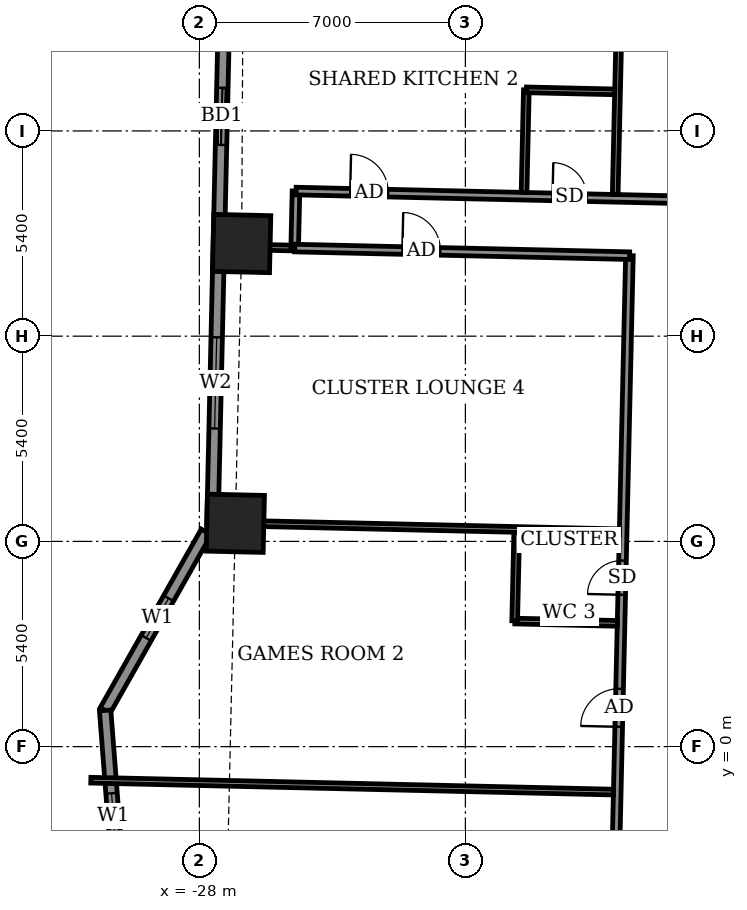
"""IFC4 building model, lengths in metres.
Left out: names, types, materials, properties, quantities, classifications, styles, units other than length and angle.
Written with IfcOpenShell. Run it as: python <this file> out.ifc"""

import sys

from ifc_helpers import new_model, si_unit, direction, frame, frame_2d, origin, origin_2d, place, context, subcontext, project, spatial, rectangle, extrude, element, fill, save


model = new_model("IFC4")
c1 = context("Model", 3, precision=1e-05, world=origin(), true_north=direction((0.0, 1.0)))
c2 = subcontext(c1, "Body", "Model", "MODEL_VIEW")
j1 = project(units=[si_unit("LENGTHUNIT", "METRE"), si_unit("PLANEANGLEUNIT", "RADIAN")], contexts=[c1])
p1 = place(None, origin())
s1 = spatial("IfcSite", under=j1, at=p1, CompositionType="ELEMENT")
p2 = place(p1, origin())
s2 = spatial("IfcBuilding", under=s1, at=p2, CompositionType="ELEMENT")
p3 = place(p2, frame((0.0, 0.0, 60.3)))
s3 = spatial("IfcBuildingStorey", under=s2, at=p3, CompositionType="ELEMENT", Elevation=60.3)
for number, where, z_axis, x_axis in (
    (1, (-26.887, 13.238, -0.55), (0.0, 0.0, 1.0), (-0.023, -1.0, 0.0)),
    (2, (-27.054, 5.877, -0.55), (0.0, 0.0, 1.0), (-0.023, -1.0, 0.0)),
):
    element("IfcColumn", number, at=place(p3, frame(where, z_axis=z_axis, x_axis=x_axis)), inside=s3, PredefinedType="COLUMN", context=c2, shape_type="SweptSolid", body=[
        extrude(rectangle(XDim=1.5, YDim=1.5, at=origin_2d()), origin(), (0.0, 0.0, 1.0), 3.6),
    ])
p4 = place(p3, frame((-27.324, 20.462, 0.0), z_axis=(0.0, 0.0, 1.0), x_axis=(-0.022695628174, -0.999742421057, 0.0)))
e3 = element("IfcWall", 3, at=p4, inside=s3, PredefinedType="SOLIDWALL", context=c2, shape_type="SweptSolid", body=[
    extrude(rectangle(XDim=14.63, YDim=0.3, at=frame_2d((7.315, 0.0))), origin(), (0.0, 0.0, 1.0), 3.05),
])
p5 = place(p4, frame((3.13, 0.0, 0.0)))
e4 = element("IfcOpeningElement", 4, at=p5, cuts=e3, PredefinedType="OPENING", context=c2, shape_type="SweptSolid", body=[
    extrude(rectangle(XDim=1.5, YDim=2.4, at=frame_2d((0.75, 1.2))), frame((0.0, 0.16, 0.0), z_axis=(0.0, -1.0, 0.0), x_axis=(1.0, 0.0, 0.0)), (0.0, 0.0, 1.0), 0.32),
])
p6 = place(p4, frame((9.694, 0.0, 0.9)))
e5 = element("IfcOpeningElement", 5, at=p6, cuts=e3, PredefinedType="OPENING", context=c2, shape_type="SweptSolid", body=[
    extrude(rectangle(XDim=2.4, YDim=1.5, at=frame_2d((1.2, 0.75))), frame((0.0, 0.16, 0.0), z_axis=(0.0, -1.0, 0.0), x_axis=(1.0, 0.0, 0.0)), (0.0, 0.0, 1.0), 0.32),
])
p7 = place(p3, frame((-27.82, 5.65, 0.0), z_axis=(0.0, 0.0, 1.0), x_axis=(-0.492554919955, -0.870281363025, 0.0)))
e6 = element("IfcWall", 6, at=p7, inside=s3, PredefinedType="SOLIDWALL", context=c2, shape_type="SweptSolid", body=[
    extrude(rectangle(XDim=5.398, YDim=0.3, at=frame_2d((2.699, 0.0))), origin(), (0.0, 0.0, 1.0), 3.05),
])
p8 = place(p7, frame((2.008, 0.0, 0.9)))
e7 = element("IfcOpeningElement", 7, at=p8, cuts=e6, PredefinedType="OPENING", context=c2, shape_type="SweptSolid", body=[
    extrude(rectangle(XDim=1.2, YDim=1.5, at=frame_2d((0.6, 0.75))), frame((0.0, 0.16, 0.0), z_axis=(0.0, -1.0, 0.0), x_axis=(1.0, 0.0, 0.0)), (0.0, 0.0, 1.0), 0.32),
])
p9 = place(p3, frame((-30.479, 0.952, 0.0), z_axis=(0.0, 0.0, 1.0), x_axis=(0.076964476481, -0.997033835614, 0.0)))
e8 = element("IfcWall", 8, at=p9, inside=s3, PredefinedType="SOLIDWALL", context=c2, shape_type="SweptSolid", body=[
    extrude(rectangle(XDim=5.573, YDim=0.3, at=frame_2d((2.787, 0.0))), origin(), (0.0, 0.0, 1.0), 3.05),
])
p10 = place(p9, frame((2.186, 0.0, 0.9)))
e9 = element("IfcOpeningElement", 9, at=p10, cuts=e8, PredefinedType="OPENING", context=c2, shape_type="SweptSolid", body=[
    extrude(rectangle(XDim=1.2, YDim=1.5, at=frame_2d((0.6, 0.75))), frame((0.0, 0.16, 0.0), z_axis=(0.0, -1.0, 0.0), x_axis=(1.0, 0.0, 0.0)), (0.0, 0.0, 1.0), 0.32),
])
p11 = place(p3, frame((-30.348, 9.078, 0.0), z_axis=(0.0, 0.0, 1.0), x_axis=(0.022665943652, 0.999743094499, 0.0)))
e10 = element("IfcWall", 10, at=p11, inside=s3, PredefinedType="USERDEFINED", context=c2, shape_type="SweptSolid", body=[
    extrude(rectangle(XDim=6.0, YDim=0.55, at=frame_2d((3.0, 0.0))), origin(), (0.0, 0.0, 1.0), 0.8),
])
p12 = place(p3, frame((-17.287, -13.625, 0.0), z_axis=(0.0, 0.0, 1.0), x_axis=(0.022712214871, 0.999742044377, 0.0)))
e11 = element("IfcWall", 11, at=p12, inside=s3, PredefinedType="PARTITIONING", context=c2, shape_type="SweptSolid", body=[
    extrude(rectangle(XDim=26.551, YDim=0.2, at=frame_2d((13.275, 0.0))), origin(), (0.0, 0.0, 1.0), 3.05),
])
p13 = place(p12, frame((14.15, 0.0, 0.0)))
e12 = element("IfcOpeningElement", 12, at=p13, cuts=e11, PredefinedType="OPENING", context=c2, shape_type="SweptSolid", body=[
    extrude(rectangle(XDim=1.0, YDim=2.1, at=frame_2d((0.5, 1.05))), frame((0.0, 0.11, 0.0), z_axis=(0.0, -1.0, 0.0), x_axis=(1.0, 0.0, 0.0)), (0.0, 0.0, 1.0), 0.22),
])
p14 = place(p12, frame((17.625, 0.0, 0.0)))
e13 = element("IfcOpeningElement", 13, at=p14, cuts=e11, PredefinedType="OPENING", context=c2, shape_type="SweptSolid", body=[
    extrude(rectangle(XDim=0.9, YDim=2.1, at=frame_2d((0.45, 1.05))), frame((0.0, 0.11, 0.0), z_axis=(0.0, -1.0, 0.0), x_axis=(1.0, 0.0, 0.0)), (0.0, 0.0, 1.0), 0.22),
])
p15 = place(p12, frame((9.875, 0.0, 0.0)))
e14 = element("IfcOpeningElement", 14, at=p15, cuts=e11, PredefinedType="OPENING", context=c2, shape_type="SweptSolid", body=[
    extrude(rectangle(XDim=1.0, YDim=2.1, at=frame_2d((0.5, 1.05))), frame((0.0, 0.11, 0.0), z_axis=(0.0, -1.0, 0.0), x_axis=(1.0, 0.0, 0.0)), (0.0, 0.0, 1.0), 0.22),
])
p16 = place(p12, frame((6.475, 0.0, 0.0)))
e15 = element("IfcOpeningElement", 15, at=p16, cuts=e11, PredefinedType="OPENING", context=c2, shape_type="SweptSolid", body=[
    extrude(rectangle(XDim=0.9, YDim=2.1, at=frame_2d((0.45, 1.05))), frame((0.0, 0.11, 0.0), z_axis=(0.0, -1.0, 0.0), x_axis=(1.0, 0.0, 0.0)), (0.0, 0.0, 1.0), 0.22),
])
p17 = place(p12, frame((0.862, 0.0, 0.0)))
e16 = element("IfcOpeningElement", 16, at=p17, cuts=e11, PredefinedType="OPENING", context=c2, shape_type="SweptSolid", body=[
    extrude(rectangle(XDim=1.0, YDim=2.1, at=frame_2d((0.5, 1.05))), frame((0.0, 0.11, 0.0), z_axis=(0.0, -1.0, 0.0), x_axis=(1.0, 0.0, 0.0)), (0.0, 0.0, 1.0), 0.22),
])
p18 = place(p12, frame((3.675, 0.0, 0.0)))
e17 = element("IfcOpeningElement", 17, at=p18, cuts=e11, PredefinedType="OPENING", context=c2, shape_type="SweptSolid", body=[
    extrude(rectangle(XDim=0.9, YDim=2.1, at=frame_2d((0.45, 1.05))), frame((0.0, 0.11, 0.0), z_axis=(0.0, -1.0, 0.0), x_axis=(1.0, 0.0, 0.0)), (0.0, 0.0, 1.0), 0.22),
])
p19 = place(p3, frame((-30.856, -0.883, 0.0), z_axis=(0.0, 0.0, 1.0), x_axis=(0.999741248952, -0.022747200787, 0.0)))
e18 = element("IfcWall", 18, at=p19, inside=s3, PredefinedType="PARTITIONING", context=c2, shape_type="SweptSolid", body=[
    extrude(rectangle(XDim=13.76, YDim=0.15, at=frame_2d((6.88, 0.0))), origin(), (0.0, 0.0, 1.0), 2.05),
])
p20 = place(p3, frame((-19.698, 3.304, 0.0), z_axis=(0.0, 0.0, 1.0), x_axis=(0.999744396973, -0.02260842146, 0.0)))
e19 = element("IfcWall", 19, at=p20, inside=s3, PredefinedType="PARTITIONING", context=c2, shape_type="SweptSolid", body=[
    extrude(rectangle(XDim=2.7, YDim=0.15, at=frame_2d((1.35, 0.0))), origin(), (0.0, 0.0, 1.0), 3.05),
])
p21 = place(p3, frame((-19.703, 3.31, 0.0), z_axis=(0.0, 0.0, 1.0), x_axis=(0.02279059109, 0.999740260747, 0.0)))
e20 = element("IfcWall", 20, at=p21, inside=s3, PredefinedType="PARTITIONING", context=c2, shape_type="SweptSolid", body=[
    extrude(rectangle(XDim=2.324, YDim=0.15, at=frame_2d((1.162, 0.0))), origin(), (0.0, 0.0, 1.0), 3.05),
])
p22 = place(p3, frame((-27.505, 5.892, 0.0), z_axis=(0.0, 0.0, 1.0), x_axis=(0.999743990669, -0.022626381091, 0.0)))
e21 = element("IfcWall", 21, at=p22, inside=s3, PredefinedType="PARTITIONING", context=c2, shape_type="SweptSolid", body=[
    extrude(rectangle(XDim=10.563, YDim=0.15, at=frame_2d((5.282, 0.0))), origin(), (0.0, 0.0, 1.0), 3.05),
])
p23 = place(p3, frame((-27.34, 13.16, 0.0), z_axis=(0.0, 0.0, 1.0), x_axis=(0.999743599624, -0.02264365277, 0.0)))
e22 = element("IfcWall", 22, at=p23, inside=s3, PredefinedType="PARTITIONING", context=c2, shape_type="SweptSolid", body=[
    extrude(rectangle(XDim=1.854, YDim=0.15, at=frame_2d((0.927, 0.0))), origin(), (0.0, 0.0, 1.0), 3.05),
])
p24 = place(p3, frame((-25.492, 13.118, 0.0), z_axis=(0.0, 0.0, 1.0), x_axis=(0.022617910375, 0.999744182344, 0.0)))
e23 = element("IfcWall", 23, at=p24, inside=s3, PredefinedType="PARTITIONING", context=c2, shape_type="SweptSolid", body=[
    extrude(rectangle(XDim=1.5, YDim=0.2, at=frame_2d((0.75, 0.0))), origin(), (0.0, 0.0, 1.0), 3.05),
])
p25 = place(p3, frame((-25.49, 13.118, 0.0), z_axis=(0.0, 0.0, 1.0), x_axis=(0.999742607231, -0.02268742575, 0.0)))
e24 = element("IfcWall", 24, at=p25, inside=s3, PredefinedType="PARTITIONING", context=c2, shape_type="SweptSolid", body=[
    extrude(rectangle(XDim=8.813, YDim=0.2, at=frame_2d((4.407, 0.0))), origin(), (0.0, 0.0, 1.0), 3.05),
])
p26 = place(p25, frame((2.832, 0.0, 0.0)))
e25 = element("IfcOpeningElement", 25, at=p26, cuts=e24, PredefinedType="OPENING", context=c2, shape_type="SweptSolid", body=[
    extrude(rectangle(XDim=1.0, YDim=2.1, at=frame_2d((0.5, 1.05))), frame((0.0, 0.11, 0.0), z_axis=(0.0, -1.0, 0.0), x_axis=(1.0, 0.0, 0.0)), (0.0, 0.0, 1.0), 0.22),
])
p27 = place(p3, frame((-25.456, 14.618, 0.0), z_axis=(0.0, 0.0, 1.0), x_axis=(0.999742687583, -0.0226838847, 0.0)))
e26 = element("IfcWall", 26, at=p27, inside=s3, PredefinedType="PARTITIONING", context=c2, shape_type="SweptSolid", body=[
    extrude(rectangle(XDim=54.836, YDim=0.2, at=frame_2d((27.418, 0.0))), origin(), (0.0, 0.0, 1.0), 3.05),
])
p28 = place(p27, frame((52.493, 0.0, 0.0)))
e27 = element("IfcOpeningElement", 27, at=p28, cuts=e26, PredefinedType="OPENING", context=c2, shape_type="SweptSolid", body=[
    extrude(rectangle(XDim=1.0, YDim=2.1, at=frame_2d((0.5, 1.05))), frame((0.0, 0.11, 0.0), z_axis=(0.0, -1.0, 0.0), x_axis=(1.0, 0.0, 0.0)), (0.0, 0.0, 1.0), 0.22),
])
p29 = place(p27, frame((47.25, 0.0, 0.0)))
e28 = element("IfcOpeningElement", 28, at=p29, cuts=e26, PredefinedType="OPENING", context=c2, shape_type="SweptSolid", body=[
    extrude(rectangle(XDim=0.9, YDim=2.1, at=frame_2d((0.45, 1.05))), frame((0.0, 0.11, 0.0), z_axis=(0.0, -1.0, 0.0), x_axis=(1.0, 0.0, 0.0)), (0.0, 0.0, 1.0), 0.22),
])
p30 = place(p27, frame((42.525, 0.0, 0.0)))
e29 = element("IfcOpeningElement", 29, at=p30, cuts=e26, PredefinedType="OPENING", context=c2, shape_type="SweptSolid", body=[
    extrude(rectangle(XDim=0.9, YDim=2.1, at=frame_2d((0.45, 1.05))), frame((0.0, 0.11, 0.0), z_axis=(0.0, -1.0, 0.0), x_axis=(1.0, 0.0, 0.0)), (0.0, 0.0, 1.0), 0.22),
])
p31 = place(p27, frame((40.275, 0.0, 0.0)))
e30 = element("IfcOpeningElement", 30, at=p31, cuts=e26, PredefinedType="OPENING", context=c2, shape_type="SweptSolid", body=[
    extrude(rectangle(XDim=0.9, YDim=2.1, at=frame_2d((0.45, 1.05))), frame((0.0, 0.11, 0.0), z_axis=(0.0, -1.0, 0.0), x_axis=(1.0, 0.0, 0.0)), (0.0, 0.0, 1.0), 0.22),
])
p32 = place(p27, frame((33.0, 0.0, 0.0)))
e31 = element("IfcOpeningElement", 31, at=p32, cuts=e26, PredefinedType="OPENING", context=c2, shape_type="SweptSolid", body=[
    extrude(rectangle(XDim=0.9, YDim=2.1, at=frame_2d((0.45, 1.05))), frame((0.0, 0.11, 0.0), z_axis=(0.0, -1.0, 0.0), x_axis=(1.0, 0.0, 0.0)), (0.0, 0.0, 1.0), 0.22),
])
p33 = place(p27, frame((30.65, 0.0, 0.0)))
e32 = element("IfcOpeningElement", 32, at=p33, cuts=e26, PredefinedType="OPENING", context=c2, shape_type="SweptSolid", body=[
    extrude(rectangle(XDim=0.9, YDim=2.1, at=frame_2d((0.45, 1.05))), frame((0.0, 0.11, 0.0), z_axis=(0.0, -1.0, 0.0), x_axis=(1.0, 0.0, 0.0)), (0.0, 0.0, 1.0), 0.22),
])
p34 = place(p27, frame((23.7, 0.0, 0.0)))
e33 = element("IfcOpeningElement", 33, at=p34, cuts=e26, PredefinedType="OPENING", context=c2, shape_type="SweptSolid", body=[
    extrude(rectangle(XDim=0.9, YDim=2.1, at=frame_2d((0.45, 1.05))), frame((0.0, 0.11, 0.0), z_axis=(0.0, -1.0, 0.0), x_axis=(1.0, 0.0, 0.0)), (0.0, 0.0, 1.0), 0.22),
])
p35 = place(p27, frame((21.425, 0.0, 0.0)))
e34 = element("IfcOpeningElement", 34, at=p35, cuts=e26, PredefinedType="OPENING", context=c2, shape_type="SweptSolid", body=[
    extrude(rectangle(XDim=0.9, YDim=2.1, at=frame_2d((0.45, 1.05))), frame((0.0, 0.11, 0.0), z_axis=(0.0, -1.0, 0.0), x_axis=(1.0, 0.0, 0.0)), (0.0, 0.0, 1.0), 0.22),
])
p36 = place(p27, frame((14.15, 0.0, 0.0)))
e35 = element("IfcOpeningElement", 35, at=p36, cuts=e26, PredefinedType="OPENING", context=c2, shape_type="SweptSolid", body=[
    extrude(rectangle(XDim=0.9, YDim=2.1, at=frame_2d((0.45, 1.05))), frame((0.0, 0.11, 0.0), z_axis=(0.0, -1.0, 0.0), x_axis=(1.0, 0.0, 0.0)), (0.0, 0.0, 1.0), 0.22),
])
p37 = place(p27, frame((11.625, 0.0, 0.0)))
e36 = element("IfcOpeningElement", 36, at=p37, cuts=e26, PredefinedType="OPENING", context=c2, shape_type="SweptSolid", body=[
    extrude(rectangle(XDim=0.9, YDim=2.1, at=frame_2d((0.45, 1.05))), frame((0.0, 0.11, 0.0), z_axis=(0.0, -1.0, 0.0), x_axis=(1.0, 0.0, 0.0)), (0.0, 0.0, 1.0), 0.22),
])
p38 = place(p27, frame((1.425, 0.0, 0.0)))
e37 = element("IfcOpeningElement", 37, at=p38, cuts=e26, PredefinedType="OPENING", context=c2, shape_type="SweptSolid", body=[
    extrude(rectangle(XDim=1.0, YDim=2.1, at=frame_2d((0.5, 1.05))), frame((0.0, 0.11, 0.0), z_axis=(0.0, -1.0, 0.0), x_axis=(1.0, 0.0, 0.0)), (0.0, 0.0, 1.0), 0.22),
])
p39 = place(p27, frame((6.75, 0.0, 0.0)))
e38 = element("IfcOpeningElement", 38, at=p39, cuts=e26, PredefinedType="OPENING", context=c2, shape_type="SweptSolid", body=[
    extrude(rectangle(XDim=0.9, YDim=2.1, at=frame_2d((0.45, 1.05))), frame((0.0, 0.11, 0.0), z_axis=(0.0, -1.0, 0.0), x_axis=(1.0, 0.0, 0.0)), (0.0, 0.0, 1.0), 0.22),
])
p40 = place(p3, frame((-19.457, 14.582, 0.0), z_axis=(0.0, 0.0, 1.0), x_axis=(0.02260842146, 0.999744396973, 0.0)))
e39 = element("IfcWall", 39, at=p40, inside=s3, PredefinedType="PARTITIONING", context=c2, shape_type="SweptSolid", body=[
    extrude(rectangle(XDim=2.7, YDim=0.15, at=frame_2d((1.35, 0.0))), origin(), (0.0, 0.0, 1.0), 3.05),
])
p41 = place(p3, frame((-17.058, 14.527, 0.0), z_axis=(0.0, 0.0, 1.0), x_axis=(0.022714440015, 0.999741993824, 0.0)))
e40 = element("IfcWall", 40, at=p41, inside=s3, PredefinedType="PARTITIONING", context=c2, shape_type="SweptSolid", body=[
    extrude(rectangle(XDim=10.351, YDim=0.15, at=frame_2d((5.175, 0.0))), origin(), (0.0, 0.0, 1.0), 2.55),
])
p42 = place(p3, frame((-19.394, 17.281, 0.0), z_axis=(0.0, 0.0, 1.0), x_axis=(0.999740260747, -0.02279059109, 0.0)))
e41 = element("IfcWall", 41, at=p42, inside=s3, PredefinedType="PARTITIONING", context=c2, shape_type="SweptSolid", body=[
    extrude(rectangle(XDim=2.324, YDim=0.15, at=frame_2d((1.162, 0.0))), origin(), (0.0, 0.0, 1.0), 3.05),
])
p43 = place(p5, origin())
e42 = element("IfcDoor", 42, at=p43, inside=s3, OperationType="SLIDING_TO_LEFT", PredefinedType="DOOR", context=c2, shape_type="SweptSolid", body=[
    extrude(rectangle(XDim=1.5, YDim=2.4, at=frame_2d((0.75, 1.2))), frame((0.0, 0.025, 0.0), z_axis=(0.0, -1.0, 0.0), x_axis=(1.0, 0.0, 0.0)), (0.0, 0.0, 1.0), 0.05),
])
fill(e4, e42)
p44 = place(p6, origin())
e43 = element("IfcWindow", 43, at=p44, inside=s3, PartitioningType="DOUBLE_PANEL_VERTICAL", PredefinedType="WINDOW", context=c2, shape_type="SweptSolid", body=[
    extrude(rectangle(XDim=2.4, YDim=1.5, at=frame_2d((1.2, 0.75))), frame((0.0, 0.03, 0.0), z_axis=(0.0, -1.0, 0.0), x_axis=(1.0, 0.0, 0.0)), (0.0, 0.0, 1.0), 0.06),
])
fill(e5, e43)
p45 = place(p8, origin())
e44 = element("IfcWindow", 44, at=p45, inside=s3, PartitioningType="SINGLE_PANEL", PredefinedType="WINDOW", context=c2, shape_type="SweptSolid", body=[
    extrude(rectangle(XDim=1.2, YDim=1.5, at=frame_2d((0.6, 0.75))), frame((0.0, 0.03, 0.0), z_axis=(0.0, -1.0, 0.0), x_axis=(1.0, 0.0, 0.0)), (0.0, 0.0, 1.0), 0.06),
])
fill(e7, e44)
p46 = place(p10, origin())
e45 = element("IfcWindow", 45, at=p46, inside=s3, PartitioningType="SINGLE_PANEL", PredefinedType="WINDOW", context=c2, shape_type="SweptSolid", body=[
    extrude(rectangle(XDim=1.2, YDim=1.5, at=frame_2d((0.6, 0.75))), frame((0.0, 0.03, 0.0), z_axis=(0.0, -1.0, 0.0), x_axis=(1.0, 0.0, 0.0)), (0.0, 0.0, 1.0), 0.06),
])
fill(e9, e45)
p47 = place(p38, origin())
e46 = element("IfcDoor", 46, at=p47, inside=s3, OperationType="SINGLE_SWING_RIGHT", PredefinedType="DOOR", context=c2, shape_type="SweptSolid", body=[
    extrude(rectangle(XDim=1.0, YDim=2.1, at=frame_2d((0.5, 1.05))), frame((0.0, 0.025, 0.0), z_axis=(0.0, -1.0, 0.0), x_axis=(1.0, 0.0, 0.0)), (0.0, 0.0, 1.0), 0.05),
])
fill(e37, e46)
p48 = place(p39, origin())
e47 = element("IfcDoor", 47, at=p48, inside=s3, OperationType="SINGLE_SWING_RIGHT", PredefinedType="DOOR", context=c2, shape_type="SweptSolid", body=[
    extrude(rectangle(XDim=0.9, YDim=2.1, at=frame_2d((0.45, 1.05))), frame((0.0, 0.025, 0.0), z_axis=(0.0, -1.0, 0.0), x_axis=(1.0, 0.0, 0.0)), (0.0, 0.0, 1.0), 0.05),
])
fill(e38, e47)
p49 = place(p26, origin())
e48 = element("IfcDoor", 48, at=p49, inside=s3, OperationType="SINGLE_SWING_LEFT", PredefinedType="DOOR", context=c2, shape_type="SweptSolid", body=[
    extrude(rectangle(XDim=1.0, YDim=2.1, at=frame_2d((0.5, 1.05))), frame((0.0, 0.025, 0.0), z_axis=(0.0, -1.0, 0.0), x_axis=(1.0, 0.0, 0.0)), (0.0, 0.0, 1.0), 0.05),
])
fill(e25, e48)
p50 = place(p13, origin())
e49 = element("IfcDoor", 49, at=p50, inside=s3, OperationType="SINGLE_SWING_RIGHT", PredefinedType="DOOR", context=c2, shape_type="SweptSolid", body=[
    extrude(rectangle(XDim=1.0, YDim=2.1, at=frame_2d((0.5, 1.05))), frame((0.0, 0.025, 0.0), z_axis=(0.0, -1.0, 0.0), x_axis=(1.0, 0.0, 0.0)), (0.0, 0.0, 1.0), 0.05),
])
fill(e12, e49)
p51 = place(p14, origin())
e50 = element("IfcDoor", 50, at=p51, inside=s3, OperationType="SINGLE_SWING_LEFT", PredefinedType="DOOR", context=c2, shape_type="SweptSolid", body=[
    extrude(rectangle(XDim=0.9, YDim=2.1, at=frame_2d((0.45, 1.05))), frame((0.0, 0.025, 0.0), z_axis=(0.0, -1.0, 0.0), x_axis=(1.0, 0.0, 0.0)), (0.0, 0.0, 1.0), 0.05),
])
fill(e13, e50)
save(model, sys.argv[1])
